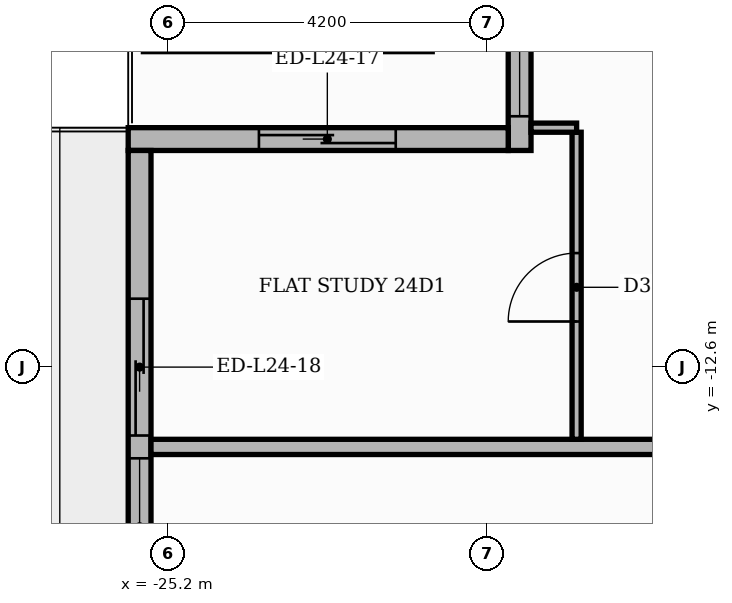
"""IFC4 building model, lengths in metres.
Left out: names, types, materials, properties, quantities, classifications, styles, units other than length and angle.
Written with IfcOpenShell. Run it as: python <this file> out.ifc"""

import sys

from ifc_helpers import new_model, si_unit, direction, frame, frame_2d, origin, place, context, subcontext, project, spatial, rectangle, extrude, element, fill, save


model = new_model("IFC4")
c1 = context("Model", 3, precision=1e-05, world=origin(), true_north=direction((0.0, 1.0)))
c2 = subcontext(c1, "Body", "Model", "MODEL_VIEW")
j1 = project(units=[si_unit("LENGTHUNIT", "METRE"), si_unit("PLANEANGLEUNIT", "RADIAN")], contexts=[c1])
p1 = place(None, origin())
s1 = spatial("IfcSite", under=j1, at=p1, CompositionType="ELEMENT")
p2 = place(p1, origin())
s2 = spatial("IfcBuilding", under=s1, at=p2, CompositionType="ELEMENT")
p3 = place(p2, frame((0.0, 0.0, 102.6)))
s3 = spatial("IfcBuildingStorey", under=s2, at=p3, CompositionType="ELEMENT", Elevation=102.6)
p4 = place(p3, frame((-20.57, 9.45, 0.0), z_axis=(0.0, 0.0, 1.0), x_axis=(0.0, -1.0, 0.0)))
e1 = element("IfcWall", 1, at=p4, inside=s3, PredefinedType="STANDARD", context=c2, shape_type="SweptSolid", body=[
    extrude(rectangle(XDim=19.2, YDim=0.3, at=frame_2d((9.6, 0.0))), origin(), (0.0, 0.0, 1.0), 3.48),
])
p5 = place(p4, frame((0.15, 0.0, 0.9)))
e2 = element("IfcOpeningElement", 2, at=p5, cuts=e1, PredefinedType="OPENING", context=c2, shape_type="SweptSolid", body=[
    extrude(rectangle(XDim=6.0, YDim=2.1, at=frame_2d((3.0, 1.05))), frame((0.0, 0.16, 0.0), z_axis=(0.0, -1.0, 0.0), x_axis=(1.0, 0.0, 0.0)), (0.0, 0.0, 1.0), 0.32),
])
p6 = place(p4, frame((6.45, 0.0, 0.9)))
e3 = element("IfcOpeningElement", 3, at=p6, cuts=e1, PredefinedType="OPENING", context=c2, shape_type="SweptSolid", body=[
    extrude(rectangle(XDim=6.0, YDim=2.1, at=frame_2d((3.0, 1.05))), frame((0.0, 0.16, 0.0), z_axis=(0.0, -1.0, 0.0), x_axis=(1.0, 0.0, 0.0)), (0.0, 0.0, 1.0), 0.32),
])
p7 = place(p4, frame((12.75, 0.0, 0.9)))
e4 = element("IfcOpeningElement", 4, at=p7, cuts=e1, PredefinedType="OPENING", context=c2, shape_type="SweptSolid", body=[
    extrude(rectangle(XDim=6.0, YDim=2.1, at=frame_2d((3.0, 1.05))), frame((0.0, 0.16, 0.0), z_axis=(0.0, -1.0, 0.0), x_axis=(1.0, 0.0, 0.0)), (0.0, 0.0, 1.0), 0.32),
])
p8 = place(p3, frame((-20.72, -9.6, 0.0), z_axis=(0.0, 0.0, 1.0), x_axis=(-1.0, 0.0, 0.0)))
e5 = element("IfcWall", 5, at=p8, inside=s3, PredefinedType="STANDARD", context=c2, shape_type="SweptSolid", body=[
    extrude(rectangle(XDim=5.0, YDim=0.3, at=frame_2d((2.5, 0.0))), origin(), (0.0, 0.0, 1.0), 3.48),
])
p9 = place(p8, frame((1.48, 0.0, 0.0)))
e6 = element("IfcOpeningElement", 6, at=p9, cuts=e5, PredefinedType="OPENING", context=c2, shape_type="SweptSolid", body=[
    extrude(rectangle(XDim=1.8, YDim=2.4, at=frame_2d((0.9, 1.2))), frame((0.0, 0.16, 0.0), z_axis=(0.0, -1.0, 0.0), x_axis=(1.0, 0.0, 0.0)), (0.0, 0.0, 1.0), 0.32),
])
p10 = place(p3, frame((-25.57, -9.75, 0.0), z_axis=(0.0, 0.0, 1.0), x_axis=(0.0, -1.0, 0.0)))
e7 = element("IfcWall", 7, at=p10, inside=s3, PredefinedType="STANDARD", context=c2, shape_type="SweptSolid", body=[
    extrude(rectangle(XDim=6.45, YDim=0.3, at=frame_2d((3.225, 0.0))), origin(), (0.0, 0.0, 1.0), 3.48),
])
p11 = place(p10, frame((1.95, 0.0, 0.0)))
e8 = element("IfcOpeningElement", 8, at=p11, cuts=e7, PredefinedType="OPENING", context=c2, shape_type="SweptSolid", body=[
    extrude(rectangle(XDim=1.8, YDim=2.4, at=frame_2d((0.9, 1.2))), frame((0.0, 0.16, 0.0), z_axis=(0.0, -1.0, 0.0), x_axis=(1.0, 0.0, 0.0)), (0.0, 0.0, 1.0), 0.32),
])
p12 = place(p10, frame((4.05, 0.0, 0.9)))
e9 = element("IfcOpeningElement", 9, at=p12, cuts=e7, PredefinedType="OPENING", context=c2, shape_type="SweptSolid", body=[
    extrude(rectangle(XDim=1.8, YDim=2.1, at=frame_2d((0.9, 1.05))), frame((0.0, 0.16, 0.0), z_axis=(0.0, -1.0, 0.0), x_axis=(1.0, 0.0, 0.0)), (0.0, 0.0, 1.0), 0.32),
])
p13 = place(p3, frame((-25.42, -13.65, 0.0), z_axis=(0.0, 0.0, 1.0), x_axis=(1.0, 0.0, 0.0)))
e10 = element("IfcWall", 10, at=p13, inside=s3, PredefinedType="PARTITIONING", context=c2, shape_type="SweptSolid", body=[
    extrude(rectangle(XDim=39.07, YDim=0.2, at=frame_2d((19.535, 0.0))), origin(), (0.0, 0.0, 1.0), 3.48),
])
p14 = place(p13, frame((14.37, 0.0, 0.0)))
e11 = element("IfcOpeningElement", 11, at=p14, cuts=e10, PredefinedType="OPENING", context=c2, shape_type="SweptSolid", body=[
    extrude(rectangle(XDim=1.1, YDim=2.4, at=frame_2d((0.55, 1.2))), frame((0.0, 0.11, 0.0), z_axis=(0.0, -1.0, 0.0), x_axis=(1.0, 0.0, 0.0)), (0.0, 0.0, 1.0), 0.22),
])
p15 = place(p3, frame((-19.82, -13.55, 0.0), z_axis=(0.0, 0.0, 1.0), x_axis=(0.0, 1.0, 0.0)))
e12 = element("IfcWall", 12, at=p15, inside=s3, PredefinedType="PARTITIONING", context=c2, shape_type="SweptSolid", body=[
    extrude(rectangle(XDim=4.04, YDim=0.12, at=frame_2d((2.02, 0.0))), origin(), (0.0, 0.0, 1.0), 3.48),
])
p16 = place(p15, frame((1.55, 0.0, 0.0)))
e13 = element("IfcOpeningElement", 13, at=p16, cuts=e12, PredefinedType="OPENING", context=c2, shape_type="SweptSolid", body=[
    extrude(rectangle(XDim=0.9, YDim=2.1, at=frame_2d((0.45, 1.05))), frame((0.0, 0.07, 0.0), z_axis=(0.0, -1.0, 0.0), x_axis=(1.0, 0.0, 0.0)), (0.0, 0.0, 1.0), 0.14),
])
p17 = place(p3, frame((-20.42, -9.45, 0.0), z_axis=(0.0, 0.0, 1.0), x_axis=(1.0, 0.0, 0.0)))
e14 = element("IfcWall", 14, at=p17, inside=s3, PredefinedType="PARTITIONING", context=c2, shape_type="SweptSolid", body=[
    extrude(rectangle(XDim=0.6, YDim=0.12, at=frame_2d((0.3, 0.0))), origin(), (0.0, 0.0, 1.0), 3.48),
])
p18 = place(p7, origin())
e15 = element("IfcWindow", 15, at=p18, inside=s3, PartitioningType="SINGLE_PANEL", PredefinedType="WINDOW", context=c2, shape_type="SweptSolid", body=[
    extrude(rectangle(XDim=6.0, YDim=2.1, at=frame_2d((3.0, 1.05))), frame((0.0, 0.03, 0.0), z_axis=(0.0, -1.0, 0.0), x_axis=(1.0, 0.0, 0.0)), (0.0, 0.0, 1.0), 0.06),
])
fill(e4, e15)
p19 = place(p9, origin())
e16 = element("IfcDoor", 16, at=p19, inside=s3, OperationType="SLIDING_TO_RIGHT", PredefinedType="DOOR", context=c2, shape_type="SweptSolid", body=[
    extrude(rectangle(XDim=1.8, YDim=2.4, at=frame_2d((0.9, 1.2))), frame((0.0, 0.025, 0.0), z_axis=(0.0, -1.0, 0.0), x_axis=(1.0, 0.0, 0.0)), (0.0, 0.0, 1.0), 0.05),
])
fill(e6, e16)
p20 = place(p11, origin())
e17 = element("IfcDoor", 17, at=p20, inside=s3, OperationType="SLIDING_TO_RIGHT", PredefinedType="DOOR", context=c2, shape_type="SweptSolid", body=[
    extrude(rectangle(XDim=1.8, YDim=2.4, at=frame_2d((0.9, 1.2))), frame((0.0, 0.025, 0.0), z_axis=(0.0, -1.0, 0.0), x_axis=(1.0, 0.0, 0.0)), (0.0, 0.0, 1.0), 0.05),
])
fill(e8, e17)
p21 = place(p12, origin())
e18 = element("IfcWindow", 18, at=p21, inside=s3, PartitioningType="SINGLE_PANEL", PredefinedType="WINDOW", context=c2, shape_type="SweptSolid", body=[
    extrude(rectangle(XDim=1.8, YDim=2.1, at=frame_2d((0.9, 1.05))), frame((0.0, 0.03, 0.0), z_axis=(0.0, -1.0, 0.0), x_axis=(1.0, 0.0, 0.0)), (0.0, 0.0, 1.0), 0.06),
])
fill(e9, e18)
p22 = place(p16, origin())
e19 = element("IfcDoor", 19, at=p22, inside=s3, OperationType="SINGLE_SWING_LEFT", PredefinedType="DOOR", context=c2, shape_type="SweptSolid", body=[
    extrude(rectangle(XDim=0.9, YDim=2.1, at=frame_2d((0.45, 1.05))), frame((0.0, 0.025, 0.0), z_axis=(0.0, -1.0, 0.0), x_axis=(1.0, 0.0, 0.0)), (0.0, 0.0, 1.0), 0.05),
])
fill(e13, e19)
save(model, sys.argv[1])
